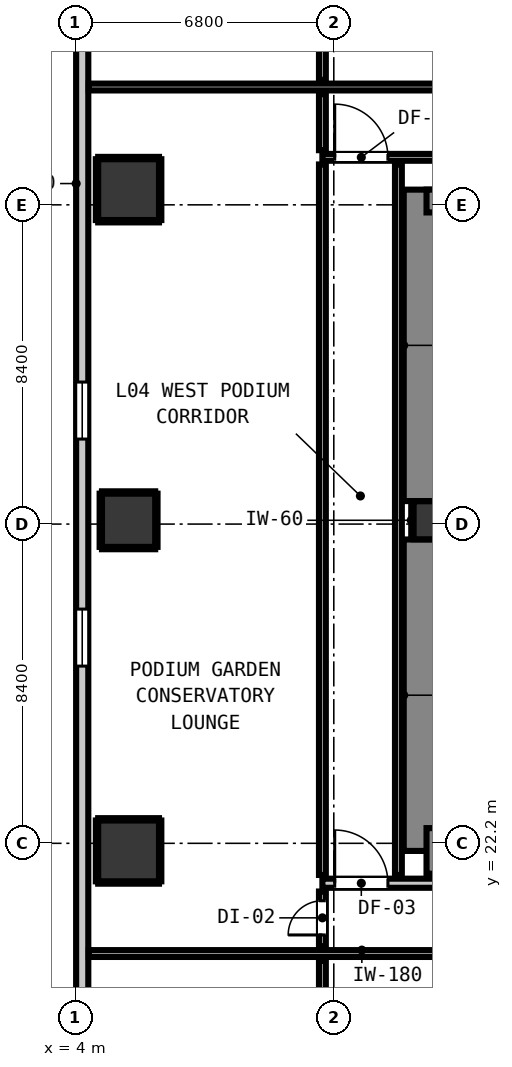
"""IFC4 building model, lengths in metres.
Left out: names, types, materials, properties, quantities, classifications, styles, units other than length and angle.
Written with IfcOpenShell. Run it as: python <this file> out.ifc"""

import sys

from ifc_helpers import new_model, si_unit, direction, frame, frame_2d, origin, origin_2d, place, context, subcontext, project, spatial, rectangle, extrude, element, fill, save


model = new_model("IFC4")
c1 = context("Model", 3, precision=1e-05, world=origin(), true_north=direction((0.0, 1.0)))
c2 = subcontext(c1, "Body", "Model", "MODEL_VIEW")
j1 = project(units=[si_unit("LENGTHUNIT", "METRE"), si_unit("PLANEANGLEUNIT", "RADIAN")], contexts=[c1])
p1 = place(None, origin())
s1 = spatial("IfcSite", under=j1, at=p1, CompositionType="ELEMENT")
p2 = place(p1, origin())
s2 = spatial("IfcBuilding", under=s1, at=p2, CompositionType="ELEMENT")
p3 = place(p2, frame((0.0, 0.0, 17.8)))
s3 = spatial("IfcBuildingStorey", under=s2, at=p3, CompositionType="ELEMENT", Elevation=17.8)
p4 = place(p3, frame((13.4, 30.7, 0.0), z_axis=(0.0, 0.0, 1.0), x_axis=(1.0, 0.0, 0.0)))
e1 = element("IfcColumn", 1, at=p4, inside=s3, PredefinedType="COLUMN", context=c2, shape_type="SweptSolid", body=[
    extrude(rectangle(XDim=1.0, YDim=1.0, at=origin_2d()), origin(), (0.0, 0.0, 1.0), 4.2),
])
p5 = place(p3, frame((13.24, 22.0, 0.0), z_axis=(0.0, 0.0, 1.0), x_axis=(0.0, 1.0, 0.0)))
e2 = element("IfcWall", 2, at=p5, inside=s3, PredefinedType="SHEAR", context=c2, shape_type="SweptSolid", body=[
    extrude(rectangle(XDim=8.195, YDim=1.2, at=frame_2d((4.098, 0.0))), origin(), (0.0, 0.0, 1.0), 4.2),
])
p6 = place(p3, frame((13.24, 31.205, 0.0), z_axis=(0.0, 0.0, 1.0), x_axis=(0.0, 1.0, 0.0)))
e3 = element("IfcWall", 3, at=p6, inside=s3, PredefinedType="SHEAR", context=c2, shape_type="SweptSolid", body=[
    extrude(rectangle(XDim=8.195, YDim=1.2, at=frame_2d((4.097, 0.0))), origin(), (0.0, 0.0, 1.0), 4.2),
])
p7 = place(p3, frame((13.24, 22.0, 0.0), z_axis=(0.0, 0.0, 1.0), x_axis=(1.0, 0.0, 0.0)))
e4 = element("IfcWall", 4, at=p7, inside=s3, PredefinedType="SHEAR", context=c2, shape_type="SweptSolid", body=[
    extrude(rectangle(XDim=4.08, YDim=1.2, at=frame_2d((2.04, 0.0))), origin(), (0.0, 0.0, 1.0), 4.2),
])
p8 = place(p3, frame((13.24, 39.1, 0.0), z_axis=(0.0, 0.0, 1.0), x_axis=(1.0, 0.0, 0.0)))
e5 = element("IfcWall", 5, at=p8, inside=s3, PredefinedType="SHEAR", context=c2, shape_type="SweptSolid", body=[
    extrude(rectangle(XDim=4.08, YDim=0.6, at=frame_2d((2.04, 0.0))), origin(), (0.0, 0.0, 1.0), 4.2),
])
p9 = place(p3, frame((5.4, 22.0, 0.0), z_axis=(0.0, 0.0, 1.0), x_axis=(1.0, 0.0, 0.0)))
e6 = element("IfcColumn", 6, at=p9, inside=s3, PredefinedType="COLUMN", context=c2, shape_type="SweptSolid", body=[
    extrude(rectangle(XDim=1.6, YDim=1.6, at=origin_2d()), origin(), (0.0, 0.0, 1.0), 3.78),
])
p10 = place(p3, frame((5.4, 30.7, 0.0), z_axis=(0.0, 0.0, 1.0), x_axis=(1.0, 0.0, 0.0)))
e7 = element("IfcColumn", 7, at=p10, inside=s3, PredefinedType="COLUMN", context=c2, shape_type="SweptSolid", body=[
    extrude(rectangle(XDim=1.4, YDim=1.4, at=origin_2d()), origin(), (0.0, 0.0, 1.0), 3.78),
])
p11 = place(p3, frame((5.4, 39.4, 0.0), z_axis=(0.0, 0.0, 1.0), x_axis=(1.0, 0.0, 0.0)))
e8 = element("IfcColumn", 8, at=p11, inside=s3, PredefinedType="COLUMN", context=c2, shape_type="SweptSolid", body=[
    extrude(rectangle(XDim=1.6, YDim=1.6, at=origin_2d()), origin(), (0.0, 0.0, 1.0), 3.78),
])
p12 = place(p3, frame((4.18, 12.68, 0.0), z_axis=(0.0, 0.0, 1.0), x_axis=(0.0, 1.0, 0.0)))
e9 = element("IfcWall", 9, at=p12, inside=s3, PredefinedType="STANDARD", context=c2, shape_type="SweptSolid", body=[
    extrude(rectangle(XDim=35.84, YDim=0.32, at=frame_2d((17.92, 0.0))), origin(), (0.0, 0.0, 1.0), 3.78),
])
p13 = place(p12, frame((2.237, 0.0, 0.9)))
e10 = element("IfcOpeningElement", 10, at=p13, cuts=e9, PredefinedType="OPENING", context=c2, shape_type="SweptSolid", body=[
    extrude(rectangle(XDim=1.5, YDim=1.8, at=frame_2d((0.75, 0.9))), frame((0.0, 0.17, 0.0), z_axis=(0.0, -1.0, 0.0), x_axis=(1.0, 0.0, 0.0)), (0.0, 0.0, 1.0), 0.34),
])
p14 = place(p12, frame((14.183, 0.0, 0.9)))
e11 = element("IfcOpeningElement", 11, at=p14, cuts=e9, PredefinedType="OPENING", context=c2, shape_type="SweptSolid", body=[
    extrude(rectangle(XDim=1.5, YDim=1.8, at=frame_2d((0.75, 0.9))), frame((0.0, 0.17, 0.0), z_axis=(0.0, -1.0, 0.0), x_axis=(1.0, 0.0, 0.0)), (0.0, 0.0, 1.0), 0.34),
])
p15 = place(p12, frame((20.157, 0.0, 0.9)))
e12 = element("IfcOpeningElement", 12, at=p15, cuts=e9, PredefinedType="OPENING", context=c2, shape_type="SweptSolid", body=[
    extrude(rectangle(XDim=1.5, YDim=1.8, at=frame_2d((0.75, 0.9))), frame((0.0, 0.17, 0.0), z_axis=(0.0, -1.0, 0.0), x_axis=(1.0, 0.0, 0.0)), (0.0, 0.0, 1.0), 0.34),
])
p16 = place(p12, frame((32.103, 0.0, 0.9)))
e13 = element("IfcOpeningElement", 13, at=p16, cuts=e9, PredefinedType="OPENING", context=c2, shape_type="SweptSolid", body=[
    extrude(rectangle(XDim=1.5, YDim=1.8, at=frame_2d((0.75, 0.9))), frame((0.0, 0.17, 0.0), z_axis=(0.0, -1.0, 0.0), x_axis=(1.0, 0.0, 0.0)), (0.0, 0.0, 1.0), 0.34),
])
p17 = place(p3, frame((10.5, 21.15, 0.0), z_axis=(0.0, 0.0, 1.0), x_axis=(1.0, 0.0, 0.0)))
e14 = element("IfcWall", 14, at=p17, inside=s3, PredefinedType="PARTITIONING", context=c2, shape_type="SweptSolid", body=[
    extrude(rectangle(XDim=28.7, YDim=0.24, at=frame_2d((14.35, 0.0))), origin(), (0.0, 0.0, 1.0), 3.78),
])
p18 = place(p17, frame((7.71, 0.0, 0.0)))
e15 = element("IfcOpeningElement", 15, at=p18, cuts=e14, PredefinedType="OPENING", context=c2, shape_type="SweptSolid", body=[
    extrude(rectangle(XDim=1.1, YDim=2.15, at=frame_2d((0.55, 1.075))), frame((0.0, 0.13, 0.0), z_axis=(0.0, -1.0, 0.0), x_axis=(1.0, 0.0, 0.0)), (0.0, 0.0, 1.0), 0.26),
])
p19 = place(p17, frame((0.324, 0.0, 0.0)))
e16 = element("IfcOpeningElement", 16, at=p19, cuts=e14, PredefinedType="OPENING", context=c2, shape_type="SweptSolid", body=[
    extrude(rectangle(XDim=1.4, YDim=2.15, at=frame_2d((0.7, 1.075))), frame((0.0, 0.13, 0.0), z_axis=(0.0, -1.0, 0.0), x_axis=(1.0, 0.0, 0.0)), (0.0, 0.0, 1.0), 0.26),
])
p20 = place(p17, frame((27.026, 0.0, 0.0)))
e17 = element("IfcOpeningElement", 17, at=p20, cuts=e14, PredefinedType="OPENING", context=c2, shape_type="SweptSolid", body=[
    extrude(rectangle(XDim=1.4, YDim=2.15, at=frame_2d((0.7, 1.075))), frame((0.0, 0.13, 0.0), z_axis=(0.0, -1.0, 0.0), x_axis=(1.0, 0.0, 0.0)), (0.0, 0.0, 1.0), 0.26),
])
p21 = place(p3, frame((4.352, 19.3, 0.0), z_axis=(0.0, 0.0, 1.0), x_axis=(1.0, 0.0, 0.0)))
e18 = element("IfcWall", 18, at=p21, inside=s3, PredefinedType="PARTITIONING", context=c2, shape_type="SweptSolid", body=[
    extrude(rectangle(XDim=43.296, YDim=0.18, at=frame_2d((21.648, 0.0))), origin(), (0.0, 0.0, 1.0), 3.78),
])
p22 = place(p21, frame((14.472, 0.0, 0.0)))
e19 = element("IfcOpeningElement", 19, at=p22, cuts=e18, PredefinedType="OPENING", context=c2, shape_type="SweptSolid", body=[
    extrude(rectangle(XDim=0.9, YDim=2.1, at=frame_2d((0.45, 1.05))), frame((0.0, 0.1, 0.0), z_axis=(0.0, -1.0, 0.0), x_axis=(1.0, 0.0, 0.0)), (0.0, 0.0, 1.0), 0.2),
])
p23 = place(p21, frame((28.774, 0.0, 0.0)))
e20 = element("IfcOpeningElement", 20, at=p23, cuts=e18, PredefinedType="OPENING", context=c2, shape_type="SweptSolid", body=[
    extrude(rectangle(XDim=0.9, YDim=2.1, at=frame_2d((0.45, 1.05))), frame((0.0, 0.1, 0.0), z_axis=(0.0, -1.0, 0.0), x_axis=(1.0, 0.0, 0.0)), (0.0, 0.0, 1.0), 0.2),
])
p24 = place(p3, frame((10.5, 40.25, 0.0), z_axis=(0.0, 0.0, 1.0), x_axis=(1.0, 0.0, 0.0)))
e21 = element("IfcWall", 21, at=p24, inside=s3, PredefinedType="PARTITIONING", context=c2, shape_type="SweptSolid", body=[
    extrude(rectangle(XDim=37.2, YDim=0.18, at=frame_2d((18.6, 0.0))), origin(), (0.0, 0.0, 1.0), 3.78),
])
p25 = place(p24, frame((6.935, 0.0, 0.0)))
e22 = element("IfcOpeningElement", 22, at=p25, cuts=e21, PredefinedType="OPENING", context=c2, shape_type="SweptSolid", body=[
    extrude(rectangle(XDim=1.4, YDim=2.15, at=frame_2d((0.7, 1.075))), frame((0.0, 0.1, 0.0), z_axis=(0.0, -1.0, 0.0), x_axis=(1.0, 0.0, 0.0)), (0.0, 0.0, 1.0), 0.2),
])
p26 = place(p24, frame((0.324, 0.0, 0.0)))
e23 = element("IfcOpeningElement", 23, at=p26, cuts=e21, PredefinedType="OPENING", context=c2, shape_type="SweptSolid", body=[
    extrude(rectangle(XDim=1.4, YDim=2.15, at=frame_2d((0.7, 1.075))), frame((0.0, 0.1, 0.0), z_axis=(0.0, -1.0, 0.0), x_axis=(1.0, 0.0, 0.0)), (0.0, 0.0, 1.0), 0.2),
])
p27 = place(p24, frame((27.05, 0.0, 0.0)))
e24 = element("IfcOpeningElement", 24, at=p27, cuts=e21, PredefinedType="OPENING", context=c2, shape_type="SweptSolid", body=[
    extrude(rectangle(XDim=1.4, YDim=2.15, at=frame_2d((0.7, 1.075))), frame((0.0, 0.1, 0.0), z_axis=(0.0, -1.0, 0.0), x_axis=(1.0, 0.0, 0.0)), (0.0, 0.0, 1.0), 0.2),
])
p28 = place(p3, frame((4.352, 42.1, 0.0), z_axis=(0.0, 0.0, 1.0), x_axis=(1.0, 0.0, 0.0)))
e25 = element("IfcWall", 25, at=p28, inside=s3, PredefinedType="PARTITIONING", context=c2, shape_type="SweptSolid", body=[
    extrude(rectangle(XDim=43.296, YDim=0.18, at=frame_2d((21.648, 0.0))), origin(), (0.0, 0.0, 1.0), 3.78),
])
p29 = place(p28, frame((14.472, 0.0, 0.0)))
e26 = element("IfcOpeningElement", 26, at=p29, cuts=e25, PredefinedType="OPENING", context=c2, shape_type="SweptSolid", body=[
    extrude(rectangle(XDim=0.9, YDim=2.1, at=frame_2d((0.45, 1.05))), frame((0.0, 0.1, 0.0), z_axis=(0.0, -1.0, 0.0), x_axis=(1.0, 0.0, 0.0)), (0.0, 0.0, 1.0), 0.2),
])
p30 = place(p28, frame((25.598, 0.0, 0.0)))
e27 = element("IfcOpeningElement", 27, at=p30, cuts=e25, PredefinedType="OPENING", context=c2, shape_type="SweptSolid", body=[
    extrude(rectangle(XDim=0.86, YDim=2.02, at=frame_2d((0.43, 1.01))), frame((0.0, 0.1, 0.0), z_axis=(0.0, -1.0, 0.0), x_axis=(1.0, 0.0, 0.0)), (0.0, 0.0, 1.0), 0.2),
])
p31 = place(p28, frame((29.218, 0.0, 0.0)))
e28 = element("IfcOpeningElement", 28, at=p31, cuts=e25, PredefinedType="OPENING", context=c2, shape_type="SweptSolid", body=[
    extrude(rectangle(XDim=0.86, YDim=2.02, at=frame_2d((0.43, 1.01))), frame((0.0, 0.1, 0.0), z_axis=(0.0, -1.0, 0.0), x_axis=(1.0, 0.0, 0.0)), (0.0, 0.0, 1.0), 0.2),
])
p32 = place(p28, frame((32.873, 0.0, 0.0)))
e29 = element("IfcOpeningElement", 29, at=p32, cuts=e25, PredefinedType="OPENING", context=c2, shape_type="SweptSolid", body=[
    extrude(rectangle(XDim=0.95, YDim=2.1, at=frame_2d((0.475, 1.05))), frame((0.0, 0.1, 0.0), z_axis=(0.0, -1.0, 0.0), x_axis=(1.0, 0.0, 0.0)), (0.0, 0.0, 1.0), 0.2),
])
p33 = place(p28, frame((35.688, 0.0, 0.0)))
e30 = element("IfcOpeningElement", 30, at=p33, cuts=e25, PredefinedType="OPENING", context=c2, shape_type="SweptSolid", body=[
    extrude(rectangle(XDim=0.9, YDim=2.1, at=frame_2d((0.45, 1.05))), frame((0.0, 0.1, 0.0), z_axis=(0.0, -1.0, 0.0), x_axis=(1.0, 0.0, 0.0)), (0.0, 0.0, 1.0), 0.2),
])
p34 = place(p3, frame((10.5, 10.352, 0.0), z_axis=(0.0, 0.0, 1.0), x_axis=(0.0, 1.0, 0.0)))
e31 = element("IfcWall", 31, at=p34, inside=s3, PredefinedType="PARTITIONING", context=c2, shape_type="SweptSolid", body=[
    extrude(rectangle(XDim=8.76, YDim=0.18, at=frame_2d((4.38, 0.0))), origin(), (0.0, 0.0, 1.0), 3.78),
])
p35 = place(p3, frame((10.5, 19.488, 0.0), z_axis=(0.0, 0.0, 1.0), x_axis=(0.0, 1.0, 0.0)))
e32 = element("IfcWall", 32, at=p35, inside=s3, PredefinedType="PARTITIONING", context=c2, shape_type="SweptSolid", body=[
    extrude(rectangle(XDim=1.444, YDim=0.18, at=frame_2d((0.722, 0.0))), origin(), (0.0, 0.0, 1.0), 3.78),
])
p36 = place(p35, frame((0.301, 0.0, 0.0)))
e33 = element("IfcOpeningElement", 33, at=p36, cuts=e32, PredefinedType="OPENING", context=c2, shape_type="SweptSolid", body=[
    extrude(rectangle(XDim=0.9, YDim=2.1, at=frame_2d((0.45, 1.05))), frame((0.0, 0.1, 0.0), z_axis=(0.0, -1.0, 0.0), x_axis=(1.0, 0.0, 0.0)), (0.0, 0.0, 1.0), 0.2),
])
p37 = place(p3, frame((10.5, 21.368, 0.0), z_axis=(0.0, 0.0, 1.0), x_axis=(0.0, 1.0, 0.0)))
e34 = element("IfcWall", 34, at=p37, inside=s3, PredefinedType="PARTITIONING", context=c2, shape_type="SweptSolid", body=[
    extrude(rectangle(XDim=18.694, YDim=0.18, at=frame_2d((9.347, 0.0))), origin(), (0.0, 0.0, 1.0), 3.78),
])
p38 = place(p3, frame((10.5, 40.438, 0.0), z_axis=(0.0, 0.0, 1.0), x_axis=(0.0, 1.0, 0.0)))
e35 = element("IfcWall", 35, at=p38, inside=s3, PredefinedType="PARTITIONING", context=c2, shape_type="SweptSolid", body=[
    extrude(rectangle(XDim=1.474, YDim=0.18, at=frame_2d((0.737, 0.0))), origin(), (0.0, 0.0, 1.0), 3.78),
])
p39 = place(p3, frame((10.5, 42.288, 0.0), z_axis=(0.0, 0.0, 1.0), x_axis=(0.0, 1.0, 0.0)))
e36 = element("IfcWall", 36, at=p39, inside=s3, PredefinedType="PARTITIONING", context=c2, shape_type="SweptSolid", body=[
    extrude(rectangle(XDim=8.56, YDim=0.18, at=frame_2d((4.28, 0.0))), origin(), (0.0, 0.0, 1.0), 3.78),
])
p40 = place(p3, frame((12.5, 21.368, 0.0), z_axis=(0.0, 0.0, 1.0), x_axis=(0.0, 1.0, 0.0)))
e37 = element("IfcWall", 37, at=p40, inside=s3, PredefinedType="PARTITIONING", context=c2, shape_type="SweptSolid", body=[
    extrude(rectangle(XDim=18.694, YDim=0.18, at=frame_2d((9.347, 0.0))), origin(), (0.0, 0.0, 1.0), 3.78),
])
p41 = place(p3, frame((12.868, 30.21, 0.0), z_axis=(0.0, 0.0, 1.0), x_axis=(0.0, 1.0, 0.0)))
e38 = element("IfcWall", 38, at=p41, inside=s3, PredefinedType="PARTITIONING", context=c2, shape_type="SweptSolid", body=[
    extrude(rectangle(XDim=0.98, YDim=0.06, at=frame_2d((0.49, 0.0))), origin(), (0.0, 0.0, 1.0), 1.45),
])
for number, where, z_axis, x_axis in (
    (39, (4.6, 21.168, 0.0), (0.0, 0.0, 1.0), (1.0, 0.0, 0.0)),
    (40, (4.6, 22.832, 0.0), (0.0, 0.0, 1.0), (1.0, 0.0, 0.0)),
):
    element("IfcWall", number, at=place(p3, frame(where, z_axis=z_axis, x_axis=x_axis)), inside=s3, PredefinedType="PARTITIONING", context=c2, shape_type="SweptSolid", body=[
        extrude(rectangle(XDim=1.6, YDim=0.06, at=frame_2d((0.8, 0.0))), origin(), (0.0, 0.0, 1.0), 1.45),
    ])
for number, where, z_axis, x_axis in (
    (41, (4.568, 21.2, 0.0), (0.0, 0.0, 1.0), (0.0, 1.0, 0.0)),
    (42, (6.232, 21.2, 0.0), (0.0, 0.0, 1.0), (0.0, 1.0, 0.0)),
):
    element("IfcWall", number, at=place(p3, frame(where, z_axis=z_axis, x_axis=x_axis)), inside=s3, PredefinedType="PARTITIONING", context=c2, shape_type="SweptSolid", body=[
        extrude(rectangle(XDim=1.6, YDim=0.06, at=frame_2d((0.8, 0.0))), origin(), (0.0, 0.0, 1.0), 1.45),
    ])
for number, where, z_axis, x_axis in (
    (43, (4.7, 29.968, 0.0), (0.0, 0.0, 1.0), (1.0, 0.0, 0.0)),
    (44, (4.7, 31.432, 0.0), (0.0, 0.0, 1.0), (1.0, 0.0, 0.0)),
):
    element("IfcWall", number, at=place(p3, frame(where, z_axis=z_axis, x_axis=x_axis)), inside=s3, PredefinedType="PARTITIONING", context=c2, shape_type="SweptSolid", body=[
        extrude(rectangle(XDim=1.4, YDim=0.06, at=frame_2d((0.7, 0.0))), origin(), (0.0, 0.0, 1.0), 1.45),
    ])
for number, where, z_axis, x_axis in (
    (45, (4.668, 30.0, 0.0), (0.0, 0.0, 1.0), (0.0, 1.0, 0.0)),
    (46, (6.132, 30.0, 0.0), (0.0, 0.0, 1.0), (0.0, 1.0, 0.0)),
):
    element("IfcWall", number, at=place(p3, frame(where, z_axis=z_axis, x_axis=x_axis)), inside=s3, PredefinedType="PARTITIONING", context=c2, shape_type="SweptSolid", body=[
        extrude(rectangle(XDim=1.4, YDim=0.06, at=frame_2d((0.7, 0.0))), origin(), (0.0, 0.0, 1.0), 1.45),
    ])
for number, where, z_axis, x_axis in (
    (47, (4.6, 38.568, 0.0), (0.0, 0.0, 1.0), (1.0, 0.0, 0.0)),
    (48, (4.6, 40.232, 0.0), (0.0, 0.0, 1.0), (1.0, 0.0, 0.0)),
    (49, (4.568, 38.6, 0.0), (0.0, 0.0, 1.0), (0.0, 1.0, 0.0)),
    (50, (6.232, 38.6, 0.0), (0.0, 0.0, 1.0), (0.0, 1.0, 0.0)),
):
    element("IfcWall", number, at=place(p3, frame(where, z_axis=z_axis, x_axis=x_axis)), inside=s3, PredefinedType="PARTITIONING", context=c2, shape_type="SweptSolid", body=[
        extrude(rectangle(XDim=1.6, YDim=0.06, at=frame_2d((0.8, 0.0))), origin(), (0.0, 0.0, 1.0), 1.45),
    ])
p42 = place(p14, origin())
e51 = element("IfcWindow", 51, at=p42, inside=s3, PartitioningType="SINGLE_PANEL", PredefinedType="WINDOW", context=c2, shape_type="SweptSolid", body=[
    extrude(rectangle(XDim=1.5, YDim=1.8, at=frame_2d((0.75, 0.9))), frame((0.0, 0.03, 0.0), z_axis=(0.0, -1.0, 0.0), x_axis=(1.0, 0.0, 0.0)), (0.0, 0.0, 1.0), 0.06),
])
fill(e11, e51)
p43 = place(p15, origin())
e52 = element("IfcWindow", 52, at=p43, inside=s3, PartitioningType="SINGLE_PANEL", PredefinedType="WINDOW", context=c2, shape_type="SweptSolid", body=[
    extrude(rectangle(XDim=1.5, YDim=1.8, at=frame_2d((0.75, 0.9))), frame((0.0, 0.03, 0.0), z_axis=(0.0, -1.0, 0.0), x_axis=(1.0, 0.0, 0.0)), (0.0, 0.0, 1.0), 0.06),
])
fill(e12, e52)
p44 = place(p19, origin())
e53 = element("IfcDoor", 53, at=p44, inside=s3, OperationType="SINGLE_SWING_LEFT", PredefinedType="DOOR", context=c2, shape_type="SweptSolid", body=[
    extrude(rectangle(XDim=1.4, YDim=2.15, at=frame_2d((0.7, 1.075))), frame((0.0, 0.025, 0.0), z_axis=(0.0, -1.0, 0.0), x_axis=(1.0, 0.0, 0.0)), (0.0, 0.0, 1.0), 0.05),
])
fill(e16, e53)
p45 = place(p26, origin())
e54 = element("IfcDoor", 54, at=p45, inside=s3, OperationType="SINGLE_SWING_LEFT", PredefinedType="DOOR", context=c2, shape_type="SweptSolid", body=[
    extrude(rectangle(XDim=1.4, YDim=2.15, at=frame_2d((0.7, 1.075))), frame((0.0, 0.025, 0.0), z_axis=(0.0, -1.0, 0.0), x_axis=(1.0, 0.0, 0.0)), (0.0, 0.0, 1.0), 0.05),
])
fill(e23, e54)
p46 = place(p36, origin())
e55 = element("IfcDoor", 55, at=p46, inside=s3, OperationType="SINGLE_SWING_LEFT", PredefinedType="DOOR", context=c2, shape_type="SweptSolid", body=[
    extrude(rectangle(XDim=0.9, YDim=2.1, at=frame_2d((0.45, 1.05))), frame((0.0, 0.025, 0.0), z_axis=(0.0, -1.0, 0.0), x_axis=(1.0, 0.0, 0.0)), (0.0, 0.0, 1.0), 0.05),
])
fill(e33, e55)
save(model, sys.argv[1])
